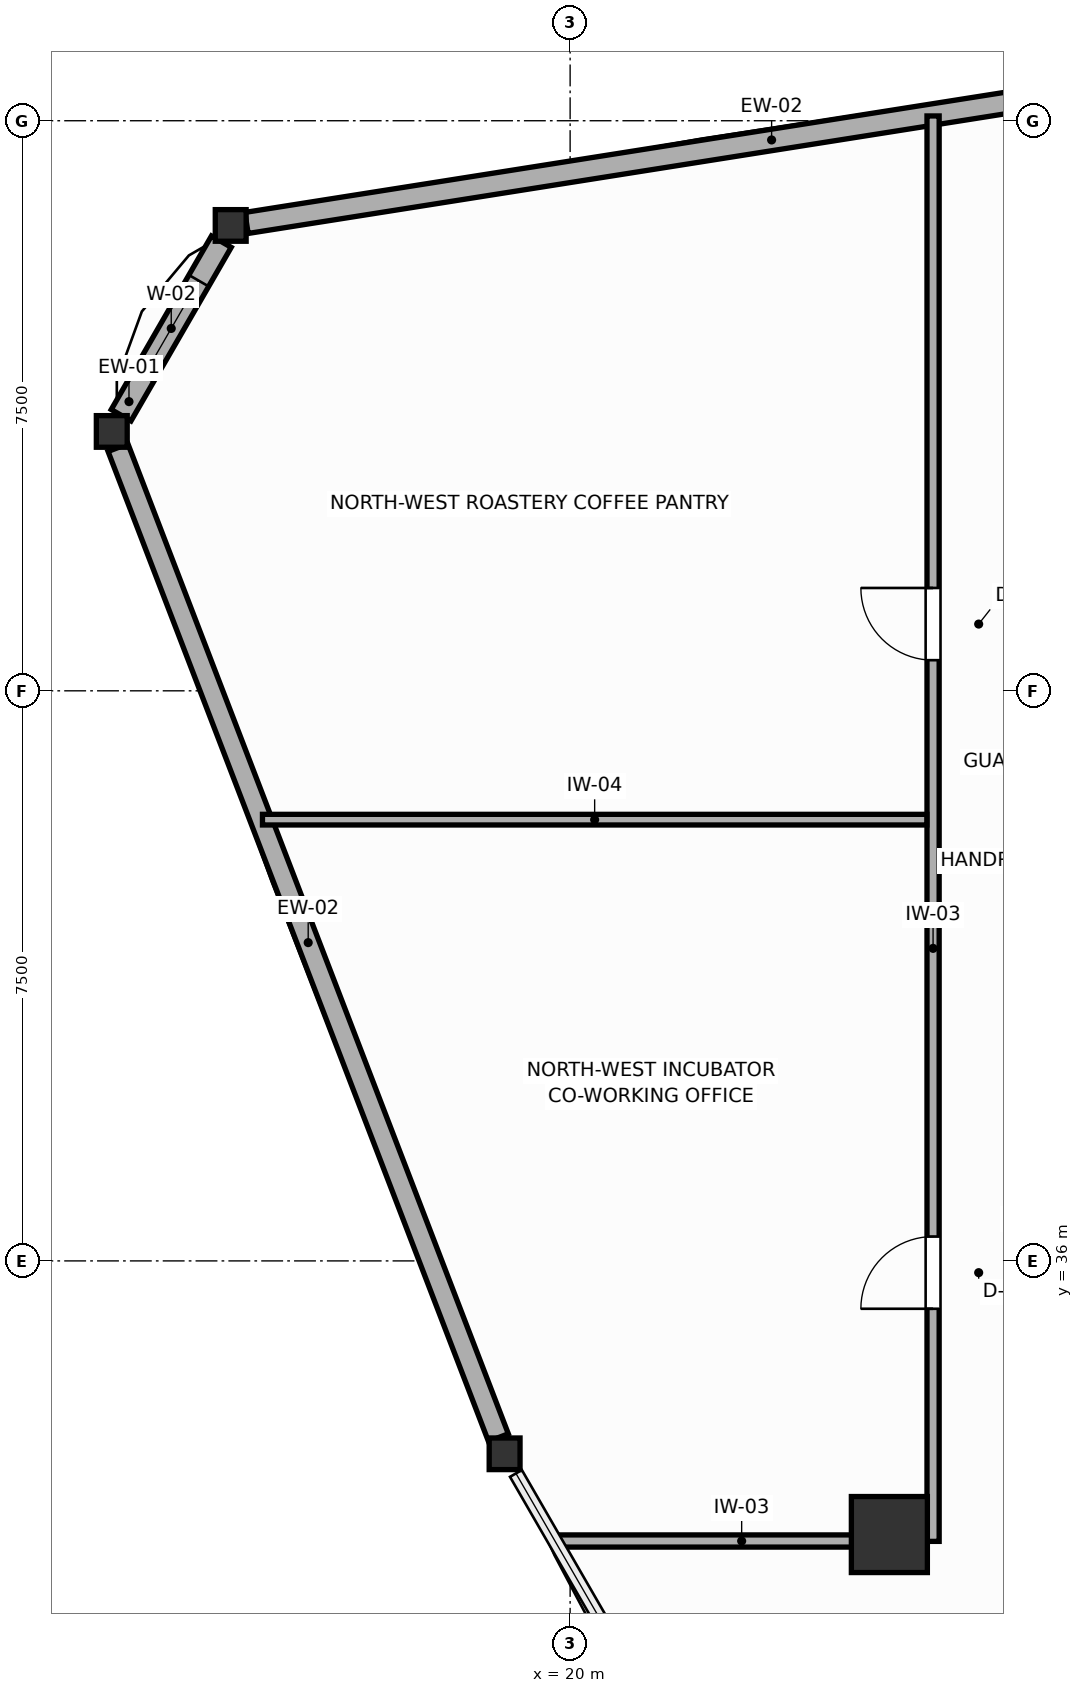
"""IFC4 building model, lengths in metres.
Left out: names, types, materials, properties, quantities, classifications, styles, units other than length and angle.
Written with IfcOpenShell. Run it as: python <this file> out.ifc"""

import sys

from ifc_helpers import new_model, si_unit, direction, frame, frame_2d, origin, origin_2d, place, context, subcontext, project, spatial, rectangle, i_section, extrude, source, transform, mapped, element, fill, save


model = new_model("IFC4")
c1 = context("Model", 3, precision=1e-05, world=origin(), true_north=direction((0.0, 1.0)))
c2 = subcontext(c1, "Body", "Model", "MODEL_VIEW")
j1 = project(units=[si_unit("LENGTHUNIT", "METRE"), si_unit("PLANEANGLEUNIT", "RADIAN")], contexts=[c1])
p1 = place(None, origin())
s1 = spatial("IfcSite", under=j1, at=p1, CompositionType="ELEMENT")
p2 = place(p1, origin())
s2 = spatial("IfcBuilding", under=s1, at=p2, CompositionType="ELEMENT")
p3 = place(p2, frame((0.0, 0.0, 190.2)))
s3 = spatial("IfcBuildingStorey", under=s2, at=p3, CompositionType="ELEMENT", Elevation=190.2)
m1 = source(origin(), c2, "Body", "SweptSolid", [
    extrude(rectangle(XDim=1.0, YDim=1.0, at=origin_2d()), origin(), (0.0, 0.0, 1.0), 3.6),
])
p4 = place(p3, frame((24.2, 32.4, 0.0), z_axis=(0.0, 0.0, 1.0), x_axis=(1.0, 0.0, 0.0)))
e1 = element("IfcColumn", 1, at=p4, inside=s3, PredefinedType="COLUMN", context=c2, shape_type="MappedRepresentation", body=[
    mapped(m1, transform((0.0, 0.0, 0.0), scale=1.0)),
])
m2 = source(origin(), c2, "Body", "SweptSolid", [
    extrude(i_section(OverallWidth=0.406, OverallDepth=0.416, WebThickness=0.027, FlangeThickness=0.044, FilletRadius=0.015, at=origin_2d()), origin(), (0.0, 0.0, 1.0), 3.6),
])
for number, where, z_axis, x_axis in (
    (2, (15.534, 49.623, 0.0), (0.0, 0.0, 1.0), (1.0, 0.0, 0.0)),
    (3, (13.97, 46.912, 0.0), (0.0, 0.0, 1.0), (1.0, 0.0, 0.0)),
    (4, (19.138, 33.462, 0.0), (0.0, 0.0, 1.0), (1.0, 0.0, 0.0)),
):
    element("IfcColumn", number, at=place(p3, frame(where, z_axis=z_axis, x_axis=x_axis)), inside=s3, PredefinedType="COLUMN", context=c2, shape_type="MappedRepresentation", body=[
        mapped(m2, transform((0.0, 0.0, 0.0), scale=1.0)),
    ])
p5 = place(p3, frame((29.559, 51.839, 0.0), z_axis=(0.0, 0.0, 1.0), x_axis=(-0.987743003355, -0.15608894683, 0.0)))
e5 = element("IfcWall", 5, at=p5, inside=s3, PredefinedType="SOLIDWALL", context=c2, shape_type="SweptSolid", body=[
    extrude(rectangle(XDim=13.988, YDim=0.28, at=frame_2d((6.994, 0.0))), origin(), (0.0, 0.0, 1.0), 2.95),
])
p6 = place(p3, frame((15.412, 49.409, 0.0), z_axis=(0.0, 0.0, 1.0), x_axis=(-0.500061666259, -0.865989797826, 0.0)))
e6 = element("IfcWall", 6, at=p6, inside=s3, PredefinedType="SOLIDWALL", context=c2, shape_type="SweptSolid", body=[
    extrude(rectangle(XDim=2.637, YDim=0.3, at=frame_2d((1.319, 0.0))), origin(), (0.0, 0.0, 1.0), 3.01),
])
p7 = place(p6, frame((0.594, 0.0, 0.75)))
e7 = element("IfcOpeningElement", 7, at=p7, cuts=e6, PredefinedType="OPENING", context=c2, shape_type="SweptSolid", body=[
    extrude(rectangle(XDim=1.45, YDim=1.65, at=frame_2d((0.725, 0.825))), frame((0.0, 0.16, 0.0), z_axis=(0.0, -1.0, 0.0), x_axis=(1.0, 0.0, 0.0)), (0.0, 0.0, 1.0), 0.32),
])
p8 = place(p3, frame((14.052, 46.699, 0.0), z_axis=(0.0, 0.0, 1.0), x_axis=(0.358703519473, -0.933451544065, 0.0)))
e8 = element("IfcWall", 8, at=p8, inside=s3, PredefinedType="SOLIDWALL", context=c2, shape_type="SweptSolid", body=[
    extrude(rectangle(XDim=13.953, YDim=0.28, at=frame_2d((6.976, 0.0))), origin(), (0.0, 0.0, 1.0), 2.95),
])
p9 = place(p3, frame((24.775, 32.31, 0.0), z_axis=(0.0, 0.0, 1.0), x_axis=(0.0, 1.0, 0.0)))
e9 = element("IfcWall", 9, at=p9, inside=s3, PredefinedType="PARTITIONING", context=c2, shape_type="SweptSolid", body=[
    extrude(rectangle(XDim=18.753, YDim=0.16, at=frame_2d((9.376, 0.0))), origin(), (0.0, 0.0, 1.0), 3.4),
])
p10 = place(p9, frame((3.06, 0.0, 0.0)))
e10 = element("IfcOpeningElement", 10, at=p10, cuts=e9, PredefinedType="OPENING", context=c2, shape_type="SweptSolid", body=[
    extrude(rectangle(XDim=0.95, YDim=2.05, at=frame_2d((0.475, 1.025))), frame((0.0, 0.09, 0.0), z_axis=(0.0, -1.0, 0.0), x_axis=(1.0, 0.0, 0.0)), (0.0, 0.0, 1.0), 0.18),
])
p11 = place(p9, frame((11.593, 0.0, 0.0)))
e11 = element("IfcOpeningElement", 11, at=p11, cuts=e9, PredefinedType="OPENING", context=c2, shape_type="SweptSolid", body=[
    extrude(rectangle(XDim=0.95, YDim=2.05, at=frame_2d((0.475, 1.025))), frame((0.0, 0.09, 0.0), z_axis=(0.0, -1.0, 0.0), x_axis=(1.0, 0.0, 0.0)), (0.0, 0.0, 1.0), 0.18),
])
p12 = place(p3, frame((19.82, 32.315, 0.0), z_axis=(0.0, 0.0, 1.0), x_axis=(1.0, 0.0, 0.0)))
e12 = element("IfcWall", 12, at=p12, inside=s3, PredefinedType="PARTITIONING", context=c2, shape_type="SweptSolid", body=[
    extrude(rectangle(XDim=4.873, YDim=0.16, at=frame_2d((2.437, 0.0))), origin(), (0.0, 0.0, 1.0), 2.95),
])
p13 = place(p3, frame((15.952, 41.805, 0.0), z_axis=(0.0, 0.0, 1.0), x_axis=(1.0, 0.0, 0.0)))
e13 = element("IfcWall", 13, at=p13, inside=s3, PredefinedType="PARTITIONING", context=c2, shape_type="SweptSolid", body=[
    extrude(rectangle(XDim=8.741, YDim=0.14, at=frame_2d((4.37, 0.0))), origin(), (0.0, 0.0, 1.0), 3.4),
])
p14 = place(p7, origin())
e14 = element("IfcWindow", 14, at=p14, inside=s3, PartitioningType="SINGLE_PANEL", PredefinedType="WINDOW", context=c2, shape_type="SweptSolid", body=[
    extrude(rectangle(XDim=1.45, YDim=1.65, at=frame_2d((0.725, 0.825))), frame((0.0, 0.03, 0.0), z_axis=(0.0, -1.0, 0.0), x_axis=(1.0, 0.0, 0.0)), (0.0, 0.0, 1.0), 0.06),
])
fill(e7, e14)
p15 = place(p10, origin())
e15 = element("IfcDoor", 15, at=p15, inside=s3, OperationType="SINGLE_SWING_LEFT", PredefinedType="DOOR", context=c2, shape_type="SweptSolid", body=[
    extrude(rectangle(XDim=0.95, YDim=2.05, at=frame_2d((0.475, 1.025))), frame((0.0, 0.025, 0.0), z_axis=(0.0, -1.0, 0.0), x_axis=(1.0, 0.0, 0.0)), (0.0, 0.0, 1.0), 0.05),
])
fill(e10, e15)
p16 = place(p11, origin())
e16 = element("IfcDoor", 16, at=p16, inside=s3, OperationType="SINGLE_SWING_RIGHT", PredefinedType="DOOR", context=c2, shape_type="SweptSolid", body=[
    extrude(rectangle(XDim=0.95, YDim=2.05, at=frame_2d((0.475, 1.025))), frame((0.0, 0.025, 0.0), z_axis=(0.0, -1.0, 0.0), x_axis=(1.0, 0.0, 0.0)), (0.0, 0.0, 1.0), 0.05),
])
fill(e11, e16)
save(model, sys.argv[1])
